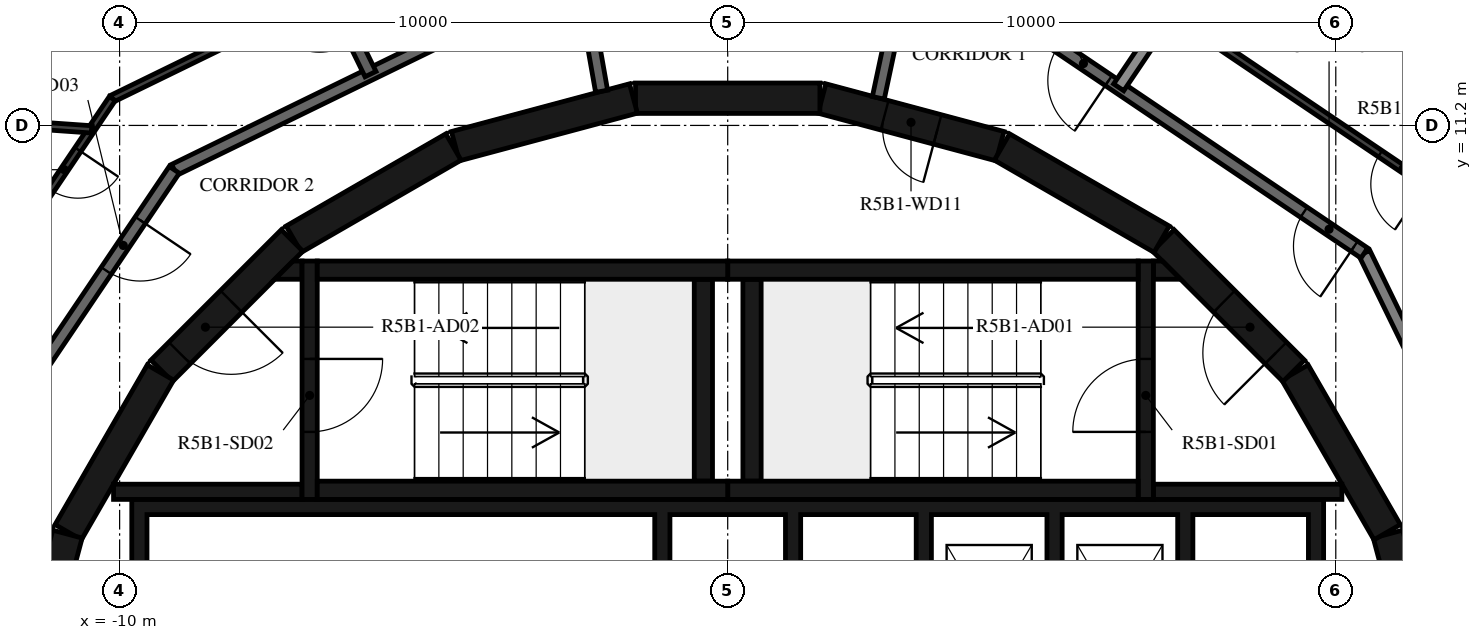
"""IFC4 building model, lengths in metres.
Left out: names, types, materials, properties, quantities, classifications, styles, units other than length and angle.
Written with IfcOpenShell. Run it as: python <this file> out.ifc"""

import sys

from ifc_helpers import new_model, si_unit, direction, frame, frame_2d, origin, place, context, subcontext, project, spatial, polyline, rectangle, outline, extrude, element, fill, save


model = new_model("IFC4")
c1 = context("Model", 3, precision=1e-05, world=origin(), true_north=direction((0.0, 1.0)))
c2 = subcontext(c1, "Body", "Model", "MODEL_VIEW")
j1 = project(units=[si_unit("LENGTHUNIT", "METRE"), si_unit("PLANEANGLEUNIT", "RADIAN")], contexts=[c1])
p1 = place(None, origin())
s1 = spatial("IfcSite", under=j1, at=p1, CompositionType="ELEMENT")
p2 = place(p1, origin())
s2 = spatial("IfcBuilding", under=s1, at=p2, CompositionType="ELEMENT")
p3 = place(p2, frame((0.0, 0.0, 198.9)))
s3 = spatial("IfcBuildingStorey", under=s2, at=p3, CompositionType="ELEMENT", Elevation=198.9)
for number, where, z_axis, x_axis in (
    (1, (11.643, 1.55, 0.0), (0.0, 0.0, 1.0), (-0.259, 0.966, 0.0)),
    (2, (10.845, 4.51, 0.0), (0.0, 0.0, 1.0), (-0.5, 0.866, 0.0)),
):
    element("IfcWall", number, at=place(p3, frame(where, z_axis=z_axis, x_axis=x_axis)), inside=s3, PredefinedType="SHEAR", context=c2, shape_type="SweptSolid", body=[
        extrude(rectangle(XDim=3.033, YDim=0.5, at=frame_2d((1.516, 0.0))), origin(), (0.0, 0.0, 1.0), 3.12),
    ])
p4 = place(p3, frame((9.308, 7.164, 0.0), z_axis=(0.0, 0.0, 1.0), x_axis=(-0.707106781187, 0.707106781187, 0.0)))
e3 = element("IfcWall", 3, at=p4, inside=s3, PredefinedType="SHEAR", context=c2, shape_type="SweptSolid", body=[
    extrude(rectangle(XDim=3.032, YDim=0.5, at=frame_2d((1.516, 0.0))), origin(), (0.0, 0.0, 1.0), 3.12),
])
p5 = place(p4, frame((0.416, 0.0, 0.0)))
e4 = element("IfcOpeningElement", 4, at=p5, cuts=e3, PredefinedType="OPENING", context=c2, shape_type="SweptSolid", body=[
    extrude(rectangle(XDim=1.2, YDim=2.1, at=frame_2d((0.6, 1.05))), frame((0.0, 0.26, 0.0), z_axis=(0.0, -1.0, 0.0), x_axis=(1.0, 0.0, 0.0)), (0.0, 0.0, 1.0), 0.52),
])
p6 = place(p3, frame((7.137, 9.329, 0.0), z_axis=(0.0, 0.0, 1.0), x_axis=(-0.865975092491, 0.500087131594, 0.0)))
e5 = element("IfcWall", 5, at=p6, inside=s3, PredefinedType="SHEAR", context=c2, shape_type="SweptSolid", body=[
    extrude(rectangle(XDim=3.033, YDim=0.5, at=frame_2d((1.516, 0.0))), origin(), (0.0, 0.0, 1.0), 3.12),
])
p7 = place(p3, frame((4.479, 10.858, 0.0), z_axis=(0.0, 0.0, 1.0), x_axis=(-0.965948410781, 0.258734743916, 0.0)))
e6 = element("IfcWall", 6, at=p7, inside=s3, PredefinedType="SHEAR", context=c2, shape_type="SweptSolid", body=[
    extrude(rectangle(XDim=3.033, YDim=0.5, at=frame_2d((1.516, 0.0))), origin(), (0.0, 0.0, 1.0), 3.12),
])
p8 = place(p7, frame((1.066, 0.0, 0.0)))
e7 = element("IfcOpeningElement", 7, at=p8, cuts=e6, PredefinedType="OPENING", context=c2, shape_type="SweptSolid", body=[
    extrude(rectangle(XDim=0.9, YDim=2.1, at=frame_2d((0.45, 1.05))), frame((0.0, 0.26, 0.0), z_axis=(0.0, -1.0, 0.0), x_axis=(1.0, 0.0, 0.0)), (0.0, 0.0, 1.0), 0.52),
])
for number, where, z_axis, x_axis in (
    (8, (1.516, 11.647, 0.0), (0.0, 0.0, 1.0), (-1.0, 0.0, 0.0)),
    (9, (-1.55, 11.643, 0.0), (0.0, 0.0, 1.0), (-0.966, -0.259, 0.0)),
    (10, (-4.51, 10.845, 0.0), (0.0, 0.0, 1.0), (-0.866, -0.5, 0.0)),
):
    element("IfcWall", number, at=place(p3, frame(where, z_axis=z_axis, x_axis=x_axis)), inside=s3, PredefinedType="SHEAR", context=c2, shape_type="SweptSolid", body=[
        extrude(rectangle(XDim=3.033, YDim=0.5, at=frame_2d((1.516, 0.0))), origin(), (0.0, 0.0, 1.0), 3.12),
    ])
p9 = place(p3, frame((-7.164, 9.308, 0.0), z_axis=(0.0, 0.0, 1.0), x_axis=(-0.707106781187, -0.707106781187, 0.0)))
e11 = element("IfcWall", 11, at=p9, inside=s3, PredefinedType="SHEAR", context=c2, shape_type="SweptSolid", body=[
    extrude(rectangle(XDim=3.032, YDim=0.5, at=frame_2d((1.516, 0.0))), origin(), (0.0, 0.0, 1.0), 3.12),
])
p10 = place(p9, frame((1.416, 0.0, 0.0)))
e12 = element("IfcOpeningElement", 12, at=p10, cuts=e11, PredefinedType="OPENING", context=c2, shape_type="SweptSolid", body=[
    extrude(rectangle(XDim=1.2, YDim=2.1, at=frame_2d((0.6, 1.05))), frame((0.0, 0.26, 0.0), z_axis=(0.0, -1.0, 0.0), x_axis=(1.0, 0.0, 0.0)), (0.0, 0.0, 1.0), 0.52),
])
for number, where, z_axis, x_axis in (
    (13, (-9.329, 7.137, 0.0), (0.0, 0.0, 1.0), (-0.5, -0.866, 0.0)),
    (14, (-10.858, 4.479, 0.0), (0.0, 0.0, 1.0), (-0.259, -0.966, 0.0)),
):
    element("IfcWall", number, at=place(p3, frame(where, z_axis=z_axis, x_axis=x_axis)), inside=s3, PredefinedType="SHEAR", context=c2, shape_type="SweptSolid", body=[
        extrude(rectangle(XDim=3.033, YDim=0.5, at=frame_2d((1.516, 0.0))), origin(), (0.0, 0.0, 1.0), 3.12),
    ])
for number, where, z_axis, x_axis in (
    (15, (0.0, 5.2, 0.0), (0.0, 0.0, 1.0), (1.0, 0.0, 0.0)),
    (16, (0.0, 8.82, 0.0), (0.0, 0.0, 1.0), (1.0, 0.0, 0.0)),
):
    element("IfcWall", number, at=place(p3, frame(where, z_axis=z_axis, x_axis=x_axis)), inside=s3, PredefinedType="SHEAR", context=c2, shape_type="SweptSolid", body=[
        extrude(rectangle(XDim=6.75, YDim=0.3, at=frame_2d((3.375, 0.0))), origin(), (0.0, 0.0, 1.0), 3.12),
    ])
p11 = place(p3, frame((0.4, 5.35, 0.0), z_axis=(0.0, 0.0, 1.0), x_axis=(0.0, 1.0, 0.0)))
e17 = element("IfcWall", 17, at=p11, inside=s3, PredefinedType="SHEAR", context=c2, shape_type="SweptSolid", body=[
    extrude(rectangle(XDim=3.32, YDim=0.3, at=frame_2d((1.66, 0.0))), origin(), (0.0, 0.0, 1.0), 3.12),
])
p12 = place(p3, frame((6.875, 5.05, 0.0), z_axis=(0.0, 0.0, 1.0), x_axis=(0.0, 1.0, 0.0)))
e18 = element("IfcWall", 18, at=p12, inside=s3, PredefinedType="SHEAR", context=c2, shape_type="SweptSolid", body=[
    extrude(rectangle(XDim=3.92, YDim=0.25, at=frame_2d((1.96, 0.0))), origin(), (0.0, 0.0, 1.0), 3.12),
])
p13 = place(p12, frame((1.11, 0.0, 0.0)))
e19 = element("IfcOpeningElement", 19, at=p13, cuts=e18, PredefinedType="OPENING", context=c2, shape_type="SweptSolid", body=[
    extrude(rectangle(XDim=1.2, YDim=2.1, at=frame_2d((0.6, 1.05))), frame((0.0, 0.135, 0.0), z_axis=(0.0, -1.0, 0.0), x_axis=(1.0, 0.0, 0.0)), (0.0, 0.0, 1.0), 0.27),
])
p14 = place(p3, frame((7.0, 5.175, 0.0), z_axis=(0.0, 0.0, 1.0), x_axis=(1.0, 0.0, 0.0)))
e20 = element("IfcWall", 20, at=p14, inside=s3, PredefinedType="SHEAR", context=c2, shape_type="SweptSolid", body=[
    extrude(rectangle(XDim=3.1, YDim=0.25, at=frame_2d((1.55, 0.0))), origin(), (0.0, 0.0, 1.0), 3.12),
])
p15 = place(p3, origin())
e21 = element("IfcWall", 21, at=p15, inside=s3, PredefinedType="SHEAR", context=c2, shape_type="SweptSolid", body=[
    extrude(outline(polyline([(7.448, 8.67), (7.0, 8.67), (7.0, 8.97), (7.148, 8.97), (7.448, 8.67)])), origin(), (0.0, 0.0, 1.0), 3.12),
])
for number, where, z_axis, x_axis in (
    (22, (-6.75, 5.2, 0.0), (0.0, 0.0, 1.0), (1.0, 0.0, 0.0)),
    (23, (-6.75, 8.82, 0.0), (0.0, 0.0, 1.0), (1.0, 0.0, 0.0)),
):
    element("IfcWall", number, at=place(p3, frame(where, z_axis=z_axis, x_axis=x_axis)), inside=s3, PredefinedType="SHEAR", context=c2, shape_type="SweptSolid", body=[
        extrude(rectangle(XDim=6.75, YDim=0.3, at=frame_2d((3.375, 0.0))), origin(), (0.0, 0.0, 1.0), 3.12),
    ])
p16 = place(p3, frame((-0.4, 5.35, 0.0), z_axis=(0.0, 0.0, 1.0), x_axis=(0.0, 1.0, 0.0)))
e24 = element("IfcWall", 24, at=p16, inside=s3, PredefinedType="SHEAR", context=c2, shape_type="SweptSolid", body=[
    extrude(rectangle(XDim=3.32, YDim=0.3, at=frame_2d((1.66, 0.0))), origin(), (0.0, 0.0, 1.0), 3.12),
])
p17 = place(p3, frame((-6.875, 8.97, 0.0), z_axis=(0.0, 0.0, 1.0), x_axis=(0.0, -1.0, 0.0)))
e25 = element("IfcWall", 25, at=p17, inside=s3, PredefinedType="SHEAR", context=c2, shape_type="SweptSolid", body=[
    extrude(rectangle(XDim=3.92, YDim=0.25, at=frame_2d((1.96, 0.0))), origin(), (0.0, 0.0, 1.0), 3.12),
])
p18 = place(p17, frame((1.61, 0.0, 0.0)))
e26 = element("IfcOpeningElement", 26, at=p18, cuts=e25, PredefinedType="OPENING", context=c2, shape_type="SweptSolid", body=[
    extrude(rectangle(XDim=1.2, YDim=2.1, at=frame_2d((0.6, 1.05))), frame((0.0, 0.135, 0.0), z_axis=(0.0, -1.0, 0.0), x_axis=(1.0, 0.0, 0.0)), (0.0, 0.0, 1.0), 0.27),
])
p19 = place(p3, frame((-7.0, 5.175, 0.0), z_axis=(0.0, 0.0, 1.0), x_axis=(-1.0, 0.0, 0.0)))
e27 = element("IfcWall", 27, at=p19, inside=s3, PredefinedType="SHEAR", context=c2, shape_type="SweptSolid", body=[
    extrude(rectangle(XDim=3.1, YDim=0.25, at=frame_2d((1.55, 0.0))), origin(), (0.0, 0.0, 1.0), 3.12),
])
p20 = place(p3, origin())
e28 = element("IfcWall", 28, at=p20, inside=s3, PredefinedType="SHEAR", context=c2, shape_type="SweptSolid", body=[
    extrude(outline(polyline([(-7.148, 8.97), (-7.0, 8.97), (-7.0, 8.67), (-7.448, 8.67), (-7.148, 8.97)])), origin(), (0.0, 0.0, 1.0), 3.12),
])
p21 = place(p3, origin())
e29 = element("IfcWall", 29, at=p21, inside=s3, PredefinedType="SHEAR", context=c2, shape_type="SweptSolid", body=[
    extrude(outline(polyline([(-9.55, 4.8), (-1.2, 4.8), (-1.2, 1.9), (-0.95, 1.9), (-0.95, 4.8), (0.95, 4.8), (0.95, 1.9), (1.2, 1.9), (1.2, 4.8), (3.1, 4.8), (3.1, 1.9), (3.35, 1.9), (3.35, 4.8), (5.25, 4.8), (5.25, 1.9), (5.5, 1.9), (5.5, 4.8), (7.4, 4.8), (7.4, 1.9), (7.65, 1.9), (7.65, 4.8), (9.55, 4.8), (9.55, 1.9), (9.8, 1.9), (9.8, 4.8), (9.8, 5.05), (-9.8, 5.05), (-9.8, 4.8), (-9.8, 1.9), (-9.55, 1.9), (-9.55, 4.8)])), origin(), (0.0, 0.0, 1.0), 3.12),
])
p22 = place(p3, frame((13.618, 2.647, 0.0), z_axis=(0.0, 0.0, 1.0), x_axis=(-0.438366026218, 0.898796543751, 0.0)))
e30 = element("IfcWall", 30, at=p22, inside=s3, PredefinedType="STANDARD", context=c2, shape_type="SweptSolid", body=[
    extrude(rectangle(XDim=7.181, YDim=0.2, at=frame_2d((3.591, 0.0))), origin(), (0.0, 0.0, 1.0), 3.12),
])
p23 = place(p3, frame((10.47, 9.101, 0.0), z_axis=(0.0, 0.0, 1.0), x_axis=(-0.829035841718, 0.559195469534, 0.0)))
e31 = element("IfcWall", 31, at=p23, inside=s3, PredefinedType="STANDARD", context=c2, shape_type="SweptSolid", body=[
    extrude(rectangle(XDim=7.181, YDim=0.2, at=frame_2d((3.591, 0.0))), origin(), (0.0, 0.0, 1.0), 3.12),
])
p24 = place(p23, frame((0.2, 0.0, 0.0)))
e32 = element("IfcOpeningElement", 32, at=p24, cuts=e31, PredefinedType="OPENING", context=c2, shape_type="SweptSolid", body=[
    extrude(rectangle(XDim=1.0, YDim=2.1, at=frame_2d((0.5, 1.05))), frame((0.0, 0.11, 0.0), z_axis=(0.0, -1.0, 0.0), x_axis=(1.0, 0.0, 0.0)), (0.0, 0.0, 1.0), 0.22),
])
p25 = place(p23, frame((5.073, 0.0, 0.0)))
e33 = element("IfcOpeningElement", 33, at=p25, cuts=e31, PredefinedType="OPENING", context=c2, shape_type="SweptSolid", body=[
    extrude(rectangle(XDim=1.0, YDim=2.1, at=frame_2d((0.5, 1.05))), frame((0.0, 0.11, 0.0), z_axis=(0.0, -1.0, 0.0), x_axis=(1.0, 0.0, 0.0)), (0.0, 0.0, 1.0), 0.22),
])
p26 = place(p3, frame((2.813, 13.236, 0.0), z_axis=(0.0, 0.0, 1.0), x_axis=(-0.207911086063, -0.978147729278, 0.0)))
e34 = element("IfcWall", 34, at=p26, inside=s3, PredefinedType="STANDARD", context=c2, shape_type="SweptSolid", body=[
    extrude(rectangle(XDim=1.618, YDim=0.2, at=frame_2d((0.809, 0.0))), origin(), (0.0, 0.0, 1.0), 3.12),
])
p27 = place(p3, frame((-2.074, 11.761, 0.0), z_axis=(0.0, 0.0, 1.0), x_axis=(-0.173740587112, 0.984791454263, 0.0)))
e35 = element("IfcWall", 35, at=p27, inside=s3, PredefinedType="STANDARD", context=c2, shape_type="SweptSolid", body=[
    extrude(rectangle(XDim=1.867, YDim=0.2, at=frame_2d((0.934, 0.0))), origin(), (0.0, 0.0, 1.0), 3.12),
])
p28 = place(p3, frame((-2.647, 13.618, 0.0), z_axis=(0.0, 0.0, 1.0), x_axis=(-0.898796543751, -0.438366026218, 0.0)))
e36 = element("IfcWall", 36, at=p28, inside=s3, PredefinedType="STANDARD", context=c2, shape_type="SweptSolid", body=[
    extrude(rectangle(XDim=7.181, YDim=0.2, at=frame_2d((3.591, 0.0))), origin(), (0.0, 0.0, 1.0), 3.12),
])
p29 = place(p3, frame((-9.101, 10.47, 0.0), z_axis=(0.0, 0.0, 1.0), x_axis=(-0.559195469534, -0.829035841718, 0.0)))
e37 = element("IfcWall", 37, at=p29, inside=s3, PredefinedType="STANDARD", context=c2, shape_type="SweptSolid", body=[
    extrude(rectangle(XDim=7.181, YDim=0.2, at=frame_2d((3.591, 0.0))), origin(), (0.0, 0.0, 1.0), 3.12),
])
p30 = place(p29, frame((1.0, 0.0, 0.0)))
e38 = element("IfcOpeningElement", 38, at=p30, cuts=e37, PredefinedType="OPENING", context=c2, shape_type="SweptSolid", body=[
    extrude(rectangle(XDim=1.0, YDim=2.1, at=frame_2d((0.5, 1.05))), frame((0.0, 0.11, 0.0), z_axis=(0.0, -1.0, 0.0), x_axis=(1.0, 0.0, 0.0)), (0.0, 0.0, 1.0), 0.22),
])
p31 = place(p3, frame((9.104, 15.79, 0.0), z_axis=(0.0, 0.0, 1.0), x_axis=(-0.559193912135, -0.829036892201, 0.0)))
e39 = element("IfcWall", 39, at=p31, inside=s3, PredefinedType="STANDARD", context=c2, shape_type="SweptSolid", body=[
    extrude(rectangle(XDim=4.781, YDim=0.2, at=frame_2d((2.39, 0.0))), origin(), (0.0, 0.0, 1.0), 2.73),
])
p32 = place(p3, frame((-8.042, 16.489, 0.0), z_axis=(0.0, 0.0, 1.0), x_axis=(0.438345825707, -0.898806395774, 0.0)))
e40 = element("IfcWall", 40, at=p32, inside=s3, PredefinedType="STANDARD", context=c2, shape_type="SweptSolid", body=[
    extrude(rectangle(XDim=4.946, YDim=0.2, at=frame_2d((2.473, 0.0))), origin(), (0.0, 0.0, 1.0), 3.12),
])
p33 = place(p3, frame((11.642, 10.12, 0.0), z_axis=(0.0, 0.0, 1.0), x_axis=(-0.829032241779, 0.55920080659, 0.0)))
e41 = element("IfcWall", 41, at=p33, inside=s3, PredefinedType="PARTITIONING", context=c2, shape_type="SweptSolid", body=[
    extrude(rectangle(XDim=7.985, YDim=0.12, at=frame_2d((3.992, 0.0))), origin(), (0.0, 0.0, 1.0), 3.12),
])
p34 = place(p33, frame((0.2, 0.0, 0.0)))
e42 = element("IfcOpeningElement", 42, at=p34, cuts=e41, PredefinedType="OPENING", context=c2, shape_type="SweptSolid", body=[
    extrude(rectangle(XDim=0.9, YDim=2.1, at=frame_2d((0.45, 1.05))), frame((0.0, 0.07, 0.0), z_axis=(0.0, -1.0, 0.0), x_axis=(1.0, 0.0, 0.0)), (0.0, 0.0, 1.0), 0.14),
])
p35 = place(p33, frame((5.475, 0.0, 0.0)))
e43 = element("IfcOpeningElement", 43, at=p35, cuts=e41, PredefinedType="OPENING", context=c2, shape_type="SweptSolid", body=[
    extrude(rectangle(XDim=0.9, YDim=2.1, at=frame_2d((0.45, 1.05))), frame((0.0, 0.07, 0.0), z_axis=(0.0, -1.0, 0.0), x_axis=(1.0, 0.0, 0.0)), (0.0, 0.0, 1.0), 0.14),
])
p36 = place(p3, frame((-6.532, 13.392, 0.0), z_axis=(0.0, 0.0, 1.0), x_axis=(-0.898786663593, -0.438386283256, 0.0)))
e44 = element("IfcWall", 44, at=p36, inside=s3, PredefinedType="PARTITIONING", context=c2, shape_type="SweptSolid", body=[
    extrude(rectangle(XDim=3.992, YDim=0.12, at=frame_2d((1.996, 0.0))), origin(), (0.0, 0.0, 1.0), 3.12),
])
p37 = place(p36, frame((0.2, 0.0, 0.0)))
e45 = element("IfcOpeningElement", 45, at=p37, cuts=e44, PredefinedType="OPENING", context=c2, shape_type="SweptSolid", body=[
    extrude(rectangle(XDim=0.9, YDim=2.1, at=frame_2d((0.45, 1.05))), frame((0.0, 0.07, 0.0), z_axis=(0.0, -1.0, 0.0), x_axis=(1.0, 0.0, 0.0)), (0.0, 0.0, 1.0), 0.14),
])
p38 = place(p3, frame((-10.12, 11.642, 0.0), z_axis=(0.0, 0.0, 1.0), x_axis=(-0.559200431187, -0.829032494996, 0.0)))
e46 = element("IfcWall", 46, at=p38, inside=s3, PredefinedType="PARTITIONING", context=c2, shape_type="SweptSolid", body=[
    extrude(rectangle(XDim=6.973, YDim=0.12, at=frame_2d((3.487, 0.0))), origin(), (0.0, 0.0, 1.0), 3.12),
])
p39 = place(p38, frame((1.011, 0.0, 0.0)))
e47 = element("IfcOpeningElement", 47, at=p39, cuts=e46, PredefinedType="OPENING", context=c2, shape_type="SweptSolid", body=[
    extrude(rectangle(XDim=0.8, YDim=2.1, at=frame_2d((0.4, 1.05))), frame((0.0, 0.07, 0.0), z_axis=(0.0, -1.0, 0.0), x_axis=(1.0, 0.0, 0.0)), (0.0, 0.0, 1.0), 0.14),
])
p40 = place(p3, frame((-13.821, 11.37, 0.0), z_axis=(0.0, 0.0, 1.0), x_axis=(0.997559977048, -0.069814698975, 0.0)))
e48 = element("IfcWall", 48, at=p40, inside=s3, PredefinedType="PARTITIONING", context=c2, shape_type="SweptSolid", body=[
    extrude(rectangle(XDim=3.368, YDim=0.12, at=frame_2d((1.684, 0.0))), origin(), (0.0, 0.0, 1.0), 3.12),
])
p41 = place(p13, origin())
e49 = element("IfcDoor", 49, at=p41, inside=s3, OperationType="SINGLE_SWING_LEFT", PredefinedType="DOOR", context=c2, shape_type="SweptSolid", body=[
    extrude(rectangle(XDim=1.2, YDim=2.1, at=frame_2d((0.6, 1.05))), frame((0.0, 0.025, 0.0), z_axis=(0.0, -1.0, 0.0), x_axis=(1.0, 0.0, 0.0)), (0.0, 0.0, 1.0), 0.05),
])
fill(e19, e49)
p42 = place(p5, origin())
e50 = element("IfcDoor", 50, at=p42, inside=s3, OperationType="SINGLE_SWING_RIGHT", PredefinedType="DOOR", context=c2, shape_type="SweptSolid", body=[
    extrude(rectangle(XDim=1.2, YDim=2.1, at=frame_2d((0.6, 1.05))), frame((0.0, 0.025, 0.0), z_axis=(0.0, -1.0, 0.0), x_axis=(1.0, 0.0, 0.0)), (0.0, 0.0, 1.0), 0.05),
])
fill(e4, e50)
p43 = place(p18, origin())
e51 = element("IfcDoor", 51, at=p43, inside=s3, OperationType="SINGLE_SWING_LEFT", PredefinedType="DOOR", context=c2, shape_type="SweptSolid", body=[
    extrude(rectangle(XDim=1.2, YDim=2.1, at=frame_2d((0.6, 1.05))), frame((0.0, 0.025, 0.0), z_axis=(0.0, -1.0, 0.0), x_axis=(1.0, 0.0, 0.0)), (0.0, 0.0, 1.0), 0.05),
])
fill(e26, e51)
p44 = place(p10, origin())
e52 = element("IfcDoor", 52, at=p44, inside=s3, OperationType="SINGLE_SWING_RIGHT", PredefinedType="DOOR", context=c2, shape_type="SweptSolid", body=[
    extrude(rectangle(XDim=1.2, YDim=2.1, at=frame_2d((0.6, 1.05))), frame((0.0, 0.025, 0.0), z_axis=(0.0, -1.0, 0.0), x_axis=(1.0, 0.0, 0.0)), (0.0, 0.0, 1.0), 0.05),
])
fill(e12, e52)
p45 = place(p8, origin())
e53 = element("IfcDoor", 53, at=p45, inside=s3, OperationType="SINGLE_SWING_LEFT", PredefinedType="DOOR", context=c2, shape_type="SweptSolid", body=[
    extrude(rectangle(XDim=0.9, YDim=2.1, at=frame_2d((0.45, 1.05))), frame((0.0, 0.025, 0.0), z_axis=(0.0, -1.0, 0.0), x_axis=(1.0, 0.0, 0.0)), (0.0, 0.0, 1.0), 0.05),
])
fill(e7, e53)
p46 = place(p24, origin())
e54 = element("IfcDoor", 54, at=p46, inside=s3, OperationType="SINGLE_SWING_LEFT", PredefinedType="DOOR", context=c2, shape_type="SweptSolid", body=[
    extrude(rectangle(XDim=1.0, YDim=2.1, at=frame_2d((0.5, 1.05))), frame((0.0, 0.025, 0.0), z_axis=(0.0, -1.0, 0.0), x_axis=(1.0, 0.0, 0.0)), (0.0, 0.0, 1.0), 0.05),
])
fill(e32, e54)
p47 = place(p34, origin())
e55 = element("IfcDoor", 55, at=p47, inside=s3, OperationType="SINGLE_SWING_LEFT", PredefinedType="DOOR", context=c2, shape_type="SweptSolid", body=[
    extrude(rectangle(XDim=0.9, YDim=2.1, at=frame_2d((0.45, 1.05))), frame((0.0, 0.025, 0.0), z_axis=(0.0, -1.0, 0.0), x_axis=(1.0, 0.0, 0.0)), (0.0, 0.0, 1.0), 0.05),
])
fill(e42, e55)
p48 = place(p25, origin())
e56 = element("IfcDoor", 56, at=p48, inside=s3, OperationType="SINGLE_SWING_RIGHT", PredefinedType="DOOR", context=c2, shape_type="SweptSolid", body=[
    extrude(rectangle(XDim=1.0, YDim=2.1, at=frame_2d((0.5, 1.05))), frame((0.0, 0.025, 0.0), z_axis=(0.0, -1.0, 0.0), x_axis=(1.0, 0.0, 0.0)), (0.0, 0.0, 1.0), 0.05),
])
fill(e33, e56)
p49 = place(p30, origin())
e57 = element("IfcDoor", 57, at=p49, inside=s3, OperationType="SINGLE_SWING_LEFT", PredefinedType="DOOR", context=c2, shape_type="SweptSolid", body=[
    extrude(rectangle(XDim=1.0, YDim=2.1, at=frame_2d((0.5, 1.05))), frame((0.0, 0.025, 0.0), z_axis=(0.0, -1.0, 0.0), x_axis=(1.0, 0.0, 0.0)), (0.0, 0.0, 1.0), 0.05),
])
fill(e38, e57)
p50 = place(p39, origin())
e58 = element("IfcDoor", 58, at=p50, inside=s3, OperationType="SINGLE_SWING_LEFT", PredefinedType="DOOR", context=c2, shape_type="SweptSolid", body=[
    extrude(rectangle(XDim=0.8, YDim=2.1, at=frame_2d((0.4, 1.05))), frame((0.0, 0.025, 0.0), z_axis=(0.0, -1.0, 0.0), x_axis=(1.0, 0.0, 0.0)), (0.0, 0.0, 1.0), 0.05),
])
fill(e47, e58)
save(model, sys.argv[1])
